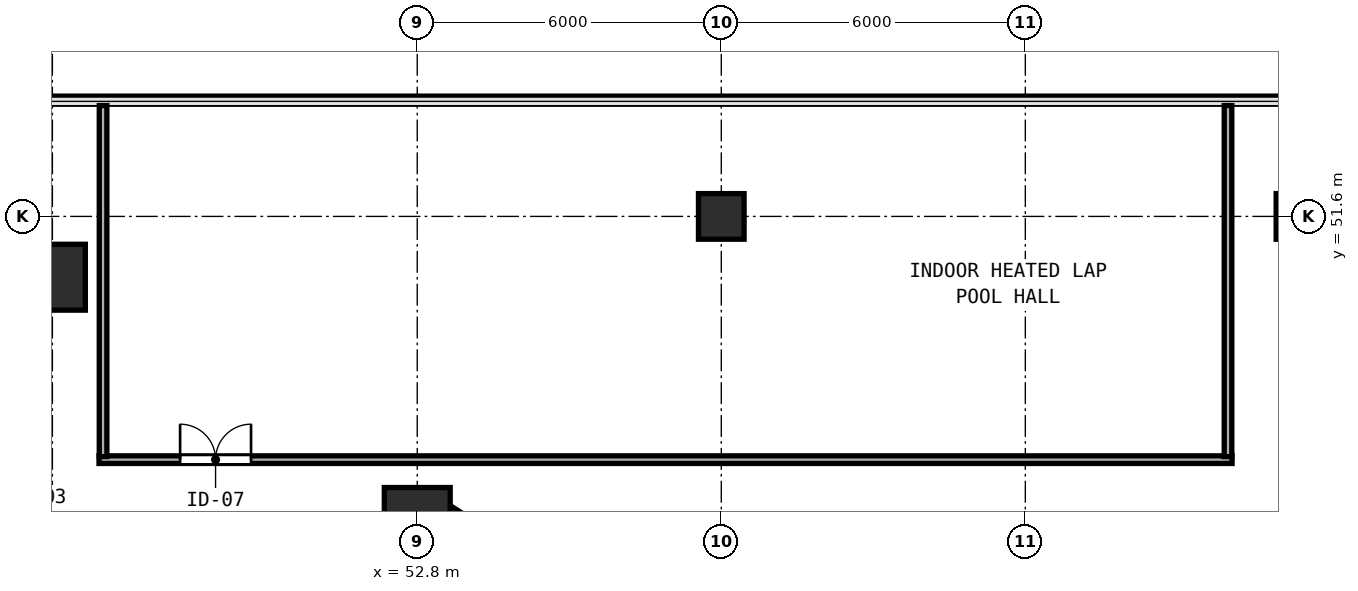
"""IFC4 building model, lengths in metres.
Left out: names, types, materials, properties, quantities, classifications, styles, units other than length and angle.
Written with IfcOpenShell. Run it as: python <this file> out.ifc"""

import sys

from ifc_helpers import new_model, si_unit, direction, frame, frame_2d, origin, origin_2d, place, context, subcontext, project, spatial, rectangle, hollow_rectangle, extrude, element, fill, save


model = new_model("IFC4")
c1 = context("Model", 3, precision=1e-05, world=origin(), true_north=direction((0.0, 1.0)))
c2 = subcontext(c1, "Body", "Model", "MODEL_VIEW")
j1 = project(units=[si_unit("LENGTHUNIT", "METRE"), si_unit("PLANEANGLEUNIT", "RADIAN")], contexts=[c1])
p1 = place(None, origin())
s1 = spatial("IfcSite", under=j1, at=p1, CompositionType="ELEMENT")
p2 = place(p1, origin())
s2 = spatial("IfcBuilding", under=s1, at=p2, CompositionType="ELEMENT")
p3 = place(p2, frame((0.0, 0.0, 19.8)))
s3 = spatial("IfcBuildingStorey", under=s2, at=p3, CompositionType="ELEMENT", Elevation=19.8)
for number, where, z_axis, x_axis in (
    (1, (52.8, 45.6, 0.0), (0.0, 0.0, 1.0), (1.0, 0.0, 0.0)),
    (2, (45.6, 50.4, 0.0), (0.0, 0.0, 1.0), (1.0, 0.0, 0.0)),
):
    element("IfcColumn", number, at=place(p3, frame(where, z_axis=z_axis, x_axis=x_axis)), inside=s3, PredefinedType="COLUMN", context=c2, shape_type="SweptSolid", body=[
        extrude(hollow_rectangle(XDim=1.3, YDim=1.3, WallThickness=0.048, at=origin_2d()), origin(), (0.0, 0.0, 1.0), 4.2),
    ])
for number, where, z_axis, x_axis in (
    (3, (58.8, 51.6, 0.0), (0.0, 0.0, 1.0), (1.0, 0.0, 0.0)),
    (4, (70.2, 51.6, 0.0), (0.0, 0.0, 1.0), (1.0, 0.0, 0.0)),
):
    element("IfcColumn", number, at=place(p3, frame(where, z_axis=z_axis, x_axis=x_axis)), inside=s3, PredefinedType="COLUMN", context=c2, shape_type="SweptSolid", body=[
        extrude(rectangle(XDim=0.9, YDim=0.9, at=origin_2d()), origin(), (0.0, 0.0, 1.0), 4.2),
    ])
for number, where, z_axis, x_axis in (
    (5, (31.2, 49.88, 0.0), (0.0, 0.0, 1.0), (1.0, 0.0, 0.0)),
    (6, (31.2, 50.92, 0.0), (0.0, 0.0, 1.0), (1.0, 0.0, 0.0)),
):
    element("IfcWall", number, at=place(p3, frame(where, z_axis=z_axis, x_axis=x_axis)), inside=s3, PredefinedType="PARTITIONING", context=c2, shape_type="SweptSolid", body=[
        extrude(rectangle(XDim=14.4, YDim=0.15, at=frame_2d((7.2, 0.0))), origin(), (0.0, 0.0, 1.0), 4.0),
    ])
p4 = place(p3, frame((53.078, 46.04, 0.0), z_axis=(0.0, 0.0, 1.0), x_axis=(0.845485460976, -0.53399844127, 0.0)))
e7 = element("IfcWall", 7, at=p4, inside=s3, PredefinedType="PARTITIONING", context=c2, shape_type="SweptSolid", body=[
    extrude(rectangle(XDim=13.484, YDim=0.15, at=frame_2d((6.742, 0.0))), origin(), (0.0, 0.0, 1.0), 4.0),
])
p5 = place(p3, frame((46.52, 46.8, 0.0), z_axis=(0.0, 0.0, 1.0), x_axis=(1.0, 0.0, 0.0)))
e8 = element("IfcWall", 8, at=p5, inside=s3, PredefinedType="PARTITIONING", context=c2, shape_type="SweptSolid", body=[
    extrude(rectangle(XDim=22.36, YDim=0.15, at=frame_2d((11.18, 0.0))), origin(), (0.0, 0.0, 1.0), 4.0),
])
p6 = place(p5, frame((1.6, 0.0, 0.0)))
e9 = element("IfcOpeningElement", 9, at=p6, cuts=e8, PredefinedType="OPENING", context=c2, shape_type="SweptSolid", body=[
    extrude(rectangle(XDim=1.4, YDim=2.18, at=frame_2d((0.7, 1.09))), frame((0.0, 0.085, 0.0), z_axis=(0.0, -1.0, 0.0), x_axis=(1.0, 0.0, 0.0)), (0.0, 0.0, 1.0), 0.17),
])
for number, where, z_axis, x_axis in (
    (10, (46.6, 46.86, 0.0), (0.0, 0.0, 1.0), (0.0, 1.0, 0.0)),
    (11, (68.8, 46.86, 0.0), (0.0, 0.0, 1.0), (0.0, 1.0, 0.0)),
):
    element("IfcWall", number, at=place(p3, frame(where, z_axis=z_axis, x_axis=x_axis)), inside=s3, PredefinedType="PARTITIONING", context=c2, shape_type="SweptSolid", body=[
        extrude(rectangle(XDim=6.928, YDim=0.15, at=frame_2d((3.464, 0.0))), origin(), (0.0, 0.0, 1.0), 4.0),
    ])
p7 = place(p6, origin())
e12 = element("IfcDoor", 12, at=p7, inside=s3, OperationType="DOUBLE_DOOR_SINGLE_SWING", PredefinedType="DOOR", context=c2, shape_type="SweptSolid", body=[
    extrude(rectangle(XDim=1.4, YDim=2.18, at=frame_2d((0.7, 1.09))), frame((0.0, 0.025, 0.0), z_axis=(0.0, -1.0, 0.0), x_axis=(1.0, 0.0, 0.0)), (0.0, 0.0, 1.0), 0.05),
])
fill(e9, e12)
save(model, sys.argv[1])
